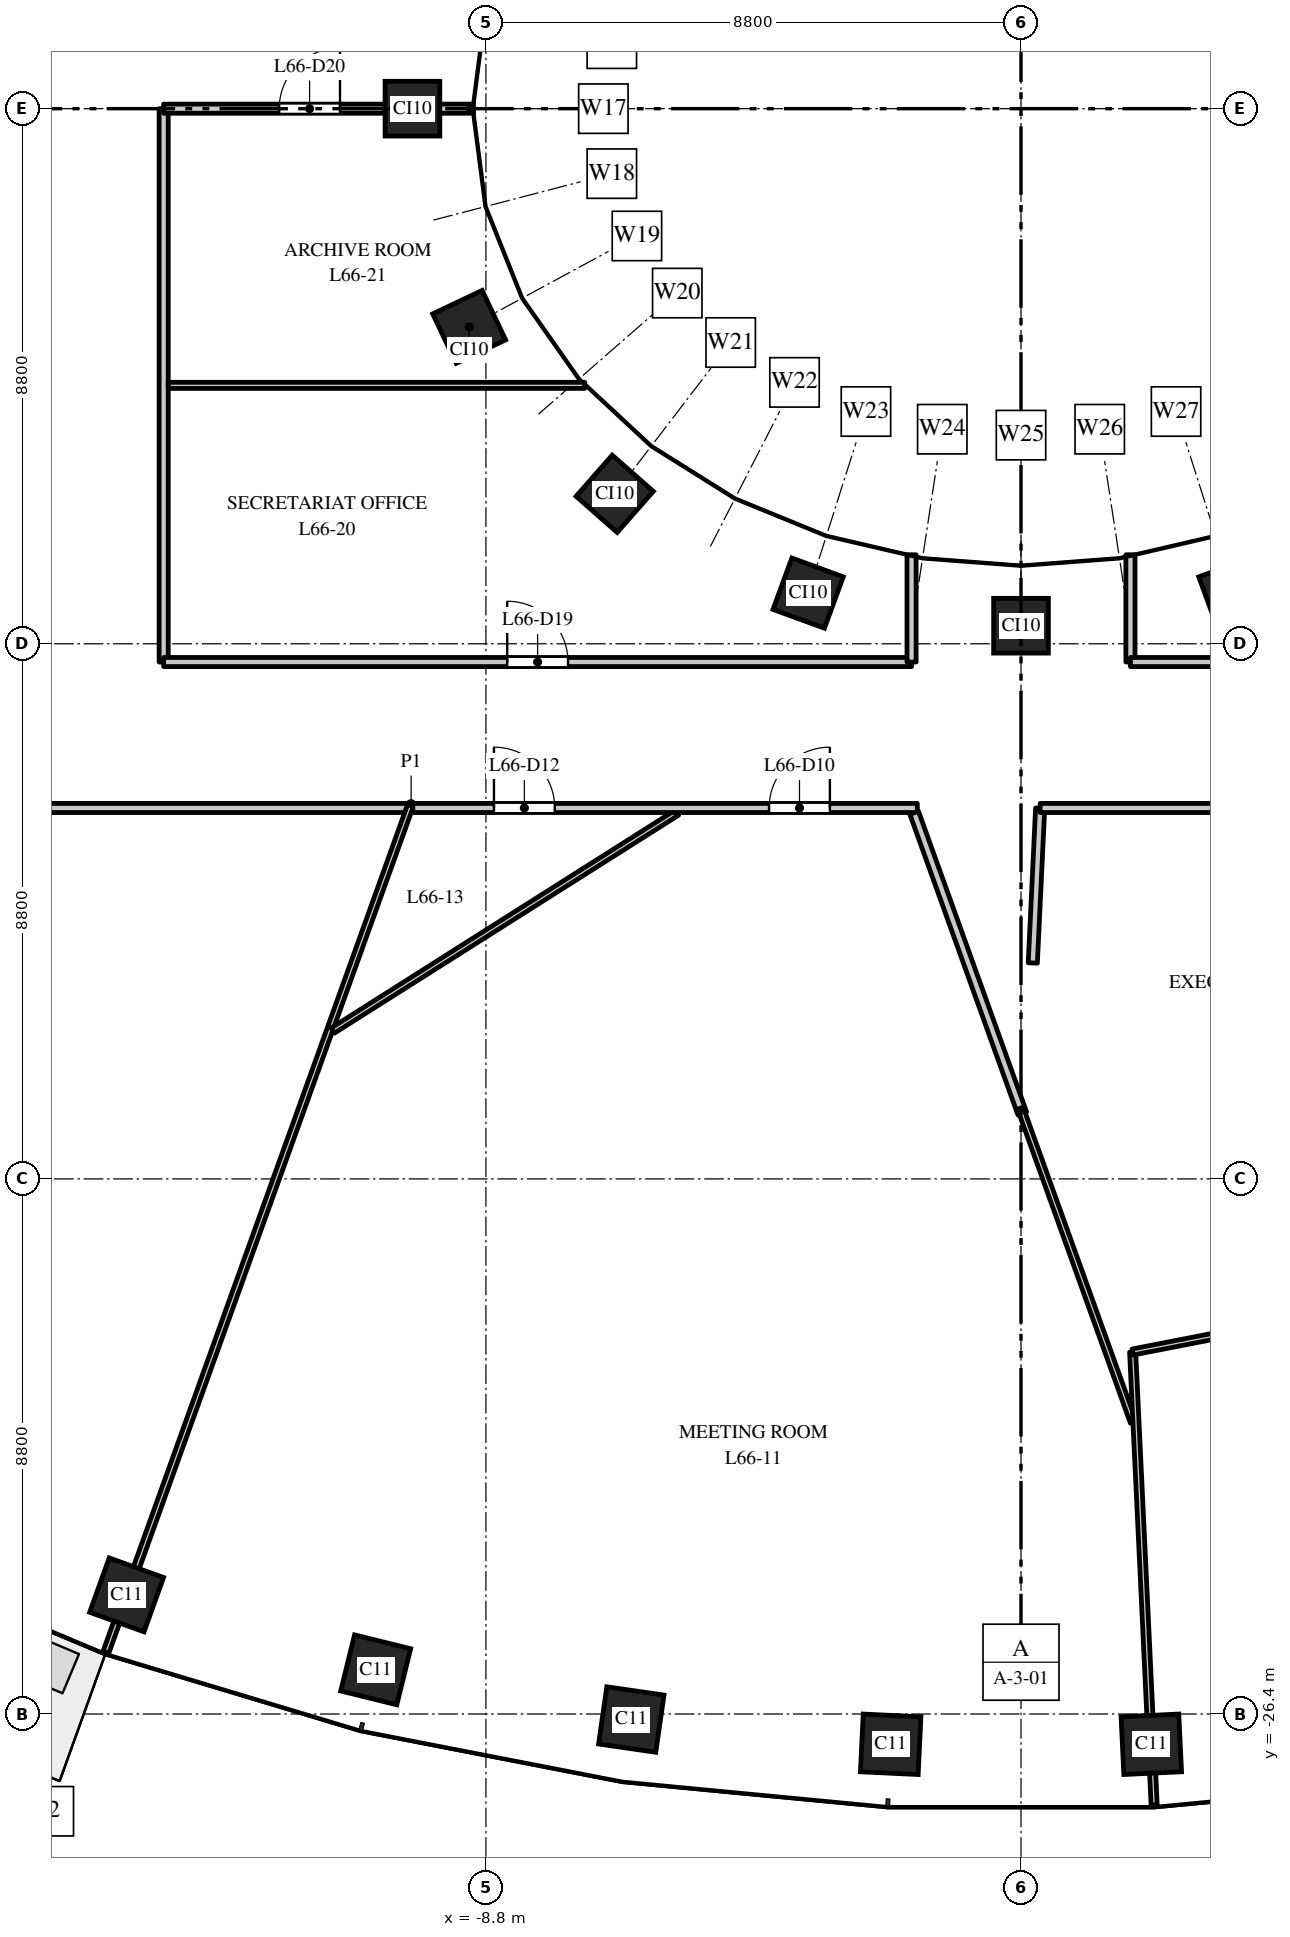
"""IFC4 building model, lengths in metres.
Left out: names, types, materials, properties, quantities, classifications, styles, units other than length and angle.
Written with IfcOpenShell. Run it as: python <this file> out.ifc"""

import sys

from ifc_helpers import new_model, si_unit, direction, frame, frame_2d, origin, origin_2d, place, context, subcontext, project, spatial, rectangle, extrude, element, fill, save


model = new_model("IFC4")
c1 = context("Model", 3, precision=1e-05, world=origin(), true_north=direction((0.0, 1.0)))
c2 = subcontext(c1, "Body", "Model", "MODEL_VIEW")
j1 = project(units=[si_unit("LENGTHUNIT", "METRE"), si_unit("PLANEANGLEUNIT", "RADIAN")], contexts=[c1])
p1 = place(None, origin())
s1 = spatial("IfcSite", under=j1, at=p1, CompositionType="ELEMENT")
p2 = place(p1, origin())
s2 = spatial("IfcBuilding", under=s1, at=p2, CompositionType="ELEMENT")
p3 = place(p2, frame((0.0, 0.0, 307.0)))
s3 = spatial("IfcBuildingStorey", under=s2, at=p3, CompositionType="ELEMENT", Elevation=307.0)
for number, where, z_axis, x_axis in (
    (1, (-14.709, -24.441, 0.0), (0.0, 0.0, 1.0), (0.941, -0.338, 0.0)),
    (2, (-10.613, -25.674, 0.0), (0.0, 0.0, 1.0), (0.971, -0.24, 0.0)),
    (3, (-6.409, -26.491, 0.0), (0.0, 0.0, 1.0), (0.99, -0.143, 0.0)),
    (4, (-2.143, -26.898, 0.0), (0.0, 0.0, 1.0), (0.999, -0.048, 0.0)),
    (5, (2.143, -26.898, 0.0), (0.0, 0.0, 1.0), (0.999, 0.048, 0.0)),
):
    element("IfcColumn", number, at=place(p3, frame(where, z_axis=z_axis, x_axis=x_axis)), inside=s3, PredefinedType="COLUMN", context=c2, shape_type="SweptSolid", body=[
        extrude(rectangle(XDim=0.95, YDim=0.95, at=origin_2d()), origin(), (0.0, 0.0, 1.0), 4.0),
    ])
for number, where, z_axis, x_axis in (
    (6, (-10.008, 0.0, 0.0), (0.0, 0.0, 1.0), (0.0, -1.0, 0.0)),
    (7, (-9.076, -3.588, 0.0), (0.0, 0.0, 1.0), (0.429, -0.903, 0.0)),
    (8, (-6.682, -6.334, 0.0), (0.0, 0.0, 1.0), (0.751, -0.66, 0.0)),
    (9, (-3.501, -7.967, 0.0), (0.0, 0.0, 1.0), (0.939, -0.344, 0.0)),
    (10, (0.0, -8.503, 0.0), (0.0, 0.0, 1.0), (1.0, 0.0, 0.0)),
    (11, (3.501, -7.967, 0.0), (0.0, 0.0, 1.0), (0.939, 0.344, 0.0)),
):
    element("IfcColumn", number, at=place(p3, frame(where, z_axis=z_axis, x_axis=x_axis)), inside=s3, PredefinedType="COLUMN", context=c2, shape_type="SweptSolid", body=[
        extrude(rectangle(XDim=0.9, YDim=0.9, at=origin_2d()), origin(), (0.0, 0.0, 1.0), 4.0),
    ])
p4 = place(p3, frame((-31.5, -11.5, 0.0), z_axis=(0.0, 0.0, 1.0), x_axis=(1.0, 0.0, 0.0)))
e12 = element("IfcWall", 12, at=p4, inside=s3, PredefinedType="PARTITIONING", context=c2, shape_type="SweptSolid", body=[
    extrude(rectangle(XDim=21.432, YDim=0.15, at=frame_2d((10.716, 0.0))), origin(), (0.0, 0.0, 1.0), 2.75),
])
p5 = place(p4, frame((2.9, 0.0, 0.0)))
e13 = element("IfcOpeningElement", 13, at=p5, cuts=e12, PredefinedType="OPENING", context=c2, shape_type="SweptSolid", body=[
    extrude(rectangle(XDim=1.0, YDim=2.1, at=frame_2d((0.5, 1.05))), frame((0.0, 0.085, 0.0), z_axis=(0.0, -1.0, 0.0), x_axis=(1.0, 0.0, 0.0)), (0.0, 0.0, 1.0), 0.17),
])
p6 = place(p4, frame((13.794, 0.0, 0.0)))
e14 = element("IfcOpeningElement", 14, at=p6, cuts=e12, PredefinedType="OPENING", context=c2, shape_type="SweptSolid", body=[
    extrude(rectangle(XDim=1.0, YDim=2.1, at=frame_2d((0.5, 1.05))), frame((0.0, 0.085, 0.0), z_axis=(0.0, -1.0, 0.0), x_axis=(1.0, 0.0, 0.0)), (0.0, 0.0, 1.0), 0.17),
])
p7 = place(p3, frame((-15.049, -25.383, 0.0), z_axis=(0.0, 0.0, 1.0), x_axis=(0.338454781071, 0.94098265721, 0.0)))
e15 = element("IfcWall", 15, at=p7, inside=s3, PredefinedType="PARTITIONING", context=c2, shape_type="SweptSolid", body=[
    extrude(rectangle(XDim=14.829, YDim=0.1, at=frame_2d((7.415, 0.0))), origin(), (0.0, 0.0, 1.0), 2.75),
])
p8 = place(p3, frame((-14.1, -9.1, 0.0), z_axis=(0.0, 0.0, 1.0), x_axis=(0.0, 1.0, 0.0)))
e16 = element("IfcWall", 16, at=p8, inside=s3, PredefinedType="PARTITIONING", context=c2, shape_type="SweptSolid", body=[
    extrude(rectangle(XDim=9.1, YDim=0.15, at=frame_2d((4.55, 0.0))), origin(), (0.0, 0.0, 1.0), 3.7),
])
p9 = place(p3, frame((-14.1, -9.1, 0.0), z_axis=(0.0, 0.0, 1.0), x_axis=(1.0, 0.0, 0.0)))
e17 = element("IfcWall", 17, at=p9, inside=s3, PredefinedType="PARTITIONING", context=c2, shape_type="SweptSolid", body=[
    extrude(rectangle(XDim=12.3, YDim=0.15, at=frame_2d((6.15, 0.0))), origin(), (0.0, 0.0, 1.0), 2.75),
])
p10 = place(p9, frame((5.65, 0.0, 0.0)))
e18 = element("IfcOpeningElement", 18, at=p10, cuts=e17, PredefinedType="OPENING", context=c2, shape_type="SweptSolid", body=[
    extrude(rectangle(XDim=1.0, YDim=2.1, at=frame_2d((0.5, 1.05))), frame((0.0, 0.085, 0.0), z_axis=(0.0, -1.0, 0.0), x_axis=(1.0, 0.0, 0.0)), (0.0, 0.0, 1.0), 0.17),
])
p11 = place(p3, frame((-14.025, -4.55, 0.0), z_axis=(0.0, 0.0, 1.0), x_axis=(1.0, 0.0, 0.0)))
e19 = element("IfcWall", 19, at=p11, inside=s3, PredefinedType="PARTITIONING", context=c2, shape_type="SweptSolid", body=[
    extrude(rectangle(XDim=6.851, YDim=0.1, at=frame_2d((3.425, 0.0))), origin(), (0.0, 0.0, 1.0), 3.0),
])
p12 = place(p3, frame((-14.1, 0.0, 0.0), z_axis=(0.0, 0.0, 1.0), x_axis=(1.0, 0.0, 0.0)))
e20 = element("IfcWall", 20, at=p12, inside=s3, PredefinedType="PARTITIONING", context=c2, shape_type="SweptSolid", body=[
    extrude(rectangle(XDim=5.095, YDim=0.15, at=frame_2d((2.548, 0.0))), origin(), (0.0, 0.0, 1.0), 3.7),
])
p13 = place(p12, frame((1.9, 0.0, 0.0)))
e21 = element("IfcOpeningElement", 21, at=p13, cuts=e20, PredefinedType="OPENING", context=c2, shape_type="SweptSolid", body=[
    extrude(rectangle(XDim=1.0, YDim=2.1, at=frame_2d((0.5, 1.05))), frame((0.0, 0.085, 0.0), z_axis=(0.0, -1.0, 0.0), x_axis=(1.0, 0.0, 0.0)), (0.0, 0.0, 1.0), 0.17),
])
p14 = place(p3, frame((-11.319, -15.161, 0.0), z_axis=(0.0, 0.0, 1.0), x_axis=(0.844865171483, 0.534979291203, 0.0)))
e22 = element("IfcWall", 22, at=p14, inside=s3, PredefinedType="PARTITIONING", context=c2, shape_type="SweptSolid", body=[
    extrude(rectangle(XDim=6.703, YDim=0.1, at=frame_2d((3.352, 0.0))), origin(), (0.0, 0.0, 1.0), 3.7),
])
p15 = place(p3, frame((-10.003, -11.5, 0.0), z_axis=(0.0, 0.0, 1.0), x_axis=(1.0, 0.0, 0.0)))
e23 = element("IfcWall", 23, at=p15, inside=s3, PredefinedType="PARTITIONING", context=c2, shape_type="SweptSolid", body=[
    extrude(rectangle(XDim=8.298, YDim=0.15, at=frame_2d((4.149, 0.0))), origin(), (0.0, 0.0, 1.0), 2.75),
])
p16 = place(p15, frame((5.86, 0.0, 0.0)))
e24 = element("IfcOpeningElement", 24, at=p16, cuts=e23, PredefinedType="OPENING", context=c2, shape_type="SweptSolid", body=[
    extrude(rectangle(XDim=1.0, YDim=2.1, at=frame_2d((0.5, 1.05))), frame((0.0, 0.085, 0.0), z_axis=(0.0, -1.0, 0.0), x_axis=(1.0, 0.0, 0.0)), (0.0, 0.0, 1.0), 0.17),
])
p17 = place(p15, frame((1.335, 0.0, 0.0)))
e25 = element("IfcOpeningElement", 25, at=p17, cuts=e23, PredefinedType="OPENING", context=c2, shape_type="SweptSolid", body=[
    extrude(rectangle(XDim=1.0, YDim=2.1, at=frame_2d((0.5, 1.05))), frame((0.0, 0.085, 0.0), z_axis=(0.0, -1.0, 0.0), x_axis=(1.0, 0.0, 0.0)), (0.0, 0.0, 1.0), 0.17),
])
p18 = place(p3, frame((-1.8, -9.1, 0.0), z_axis=(0.0, 0.0, 1.0), x_axis=(0.0, 1.0, 0.0)))
e26 = element("IfcWall", 26, at=p18, inside=s3, PredefinedType="PARTITIONING", context=c2, shape_type="SweptSolid", body=[
    extrude(rectangle(XDim=1.764, YDim=0.15, at=frame_2d((0.882, 0.0))), origin(), (0.0, 0.0, 1.0), 3.0),
])
p19 = place(p3, frame((-1.757, -11.579, 0.0), z_axis=(0.0, 0.0, 1.0), x_axis=(0.338313142308, -0.941033590124, 0.0)))
e27 = element("IfcWall", 27, at=p19, inside=s3, PredefinedType="PARTITIONING", context=c2, shape_type="SweptSolid", body=[
    extrude(rectangle(XDim=5.256, YDim=0.15, at=frame_2d((2.628, 0.0))), origin(), (0.0, 0.0, 1.0), 2.85),
])
p20 = place(p3, frame((-0.01, -16.438, 0.0), z_axis=(0.0, 0.0, 1.0), x_axis=(0.338376018219, -0.941010983089, 0.0)))
e28 = element("IfcWall", 28, at=p20, inside=s3, PredefinedType="PARTITIONING", context=c2, shape_type="SweptSolid", body=[
    extrude(rectangle(XDim=5.488, YDim=0.1, at=frame_2d((2.744, 0.0))), origin(), (0.0, 0.0, 1.0), 3.7),
])
p21 = place(p3, frame((0.194, -14.049, 0.0), z_axis=(0.0, 0.0, 1.0), x_axis=(0.047428579634, 0.99887463169, 0.0)))
e29 = element("IfcWall", 29, at=p21, inside=s3, PredefinedType="PARTITIONING", context=c2, shape_type="SweptSolid", body=[
    extrude(rectangle(XDim=2.548, YDim=0.15, at=frame_2d((1.274, 0.0))), origin(), (0.0, 0.0, 1.0), 3.7),
])
p22 = place(p3, frame((0.315, -11.5, 0.0), z_axis=(0.0, 0.0, 1.0), x_axis=(1.0, 0.0, 0.0)))
e30 = element("IfcWall", 30, at=p22, inside=s3, PredefinedType="PARTITIONING", context=c2, shape_type="SweptSolid", body=[
    extrude(rectangle(XDim=31.185, YDim=0.15, at=frame_2d((15.593, 0.0))), origin(), (0.0, 0.0, 1.0), 2.75),
])
p23 = place(p22, frame((10.9, 0.0, 0.0)))
e31 = element("IfcOpeningElement", 31, at=p23, cuts=e30, PredefinedType="OPENING", context=c2, shape_type="SweptSolid", body=[
    extrude(rectangle(XDim=1.0, YDim=2.1, at=frame_2d((0.5, 1.05))), frame((0.0, 0.085, 0.0), z_axis=(0.0, -1.0, 0.0), x_axis=(1.0, 0.0, 0.0)), (0.0, 0.0, 1.0), 0.17),
])
p24 = place(p22, frame((26.003, 0.0, 0.0)))
e32 = element("IfcOpeningElement", 32, at=p24, cuts=e30, PredefinedType="OPENING", context=c2, shape_type="SweptSolid", body=[
    extrude(rectangle(XDim=1.0, YDim=2.1, at=frame_2d((0.5, 1.05))), frame((0.0, 0.085, 0.0), z_axis=(0.0, -1.0, 0.0), x_axis=(1.0, 0.0, 0.0)), (0.0, 0.0, 1.0), 0.17),
])
p25 = place(p3, frame((1.8, -9.1, 0.0), z_axis=(0.0, 0.0, 1.0), x_axis=(0.0, 1.0, 0.0)))
e33 = element("IfcWall", 33, at=p25, inside=s3, PredefinedType="PARTITIONING", context=c2, shape_type="SweptSolid", body=[
    extrude(rectangle(XDim=1.764, YDim=0.15, at=frame_2d((0.882, 0.0))), origin(), (0.0, 0.0, 1.0), 3.0),
])
p26 = place(p3, frame((1.8, -9.1, 0.0), z_axis=(0.0, 0.0, 1.0), x_axis=(1.0, 0.0, 0.0)))
e34 = element("IfcWall", 34, at=p26, inside=s3, PredefinedType="PARTITIONING", context=c2, shape_type="SweptSolid", body=[
    extrude(rectangle(XDim=12.3, YDim=0.15, at=frame_2d((6.15, 0.0))), origin(), (0.0, 0.0, 1.0), 2.85),
])
p27 = place(p26, frame((5.65, 0.0, 0.0)))
e35 = element("IfcOpeningElement", 35, at=p27, cuts=e34, PredefinedType="OPENING", context=c2, shape_type="SweptSolid", body=[
    extrude(rectangle(XDim=1.0, YDim=2.1, at=frame_2d((0.5, 1.05))), frame((0.0, 0.085, 0.0), z_axis=(0.0, -1.0, 0.0), x_axis=(1.0, 0.0, 0.0)), (0.0, 0.0, 1.0), 0.17),
])
p28 = place(p3, frame((1.836, -20.448, 0.0), z_axis=(0.0, 0.0, 1.0), x_axis=(0.04746405939, -0.998872946408, 0.0)))
e36 = element("IfcWall", 36, at=p28, inside=s3, PredefinedType="PARTITIONING", context=c2, shape_type="SweptSolid", body=[
    extrude(rectangle(XDim=7.458, YDim=0.1, at=frame_2d((3.729, 0.0))), origin(), (0.0, 0.0, 1.0), 3.0),
])
p29 = place(p3, frame((1.836, -20.447, 0.0), z_axis=(0.0, 0.0, 1.0), x_axis=(0.98151990149, 0.191360087216, 0.0)))
e37 = element("IfcWall", 37, at=p29, inside=s3, PredefinedType="PARTITIONING", context=c2, shape_type="SweptSolid", body=[
    extrude(rectangle(XDim=11.032, YDim=0.1, at=frame_2d((5.516, 0.0))), origin(), (0.0, 0.0, 1.0), 2.85),
])
p30 = place(p16, origin())
e38 = element("IfcDoor", 38, at=p30, inside=s3, OperationType="SINGLE_SWING_RIGHT", PredefinedType="DOOR", context=c2, shape_type="SweptSolid", body=[
    extrude(rectangle(XDim=1.0, YDim=2.1, at=frame_2d((0.5, 1.05))), frame((0.0, 0.025, 0.0), z_axis=(0.0, -1.0, 0.0), x_axis=(1.0, 0.0, 0.0)), (0.0, 0.0, 1.0), 0.05),
])
fill(e24, e38)
p31 = place(p17, origin())
e39 = element("IfcDoor", 39, at=p31, inside=s3, OperationType="SINGLE_SWING_LEFT", PredefinedType="DOOR", context=c2, shape_type="SweptSolid", body=[
    extrude(rectangle(XDim=1.0, YDim=2.1, at=frame_2d((0.5, 1.05))), frame((0.0, 0.025, 0.0), z_axis=(0.0, -1.0, 0.0), x_axis=(1.0, 0.0, 0.0)), (0.0, 0.0, 1.0), 0.05),
])
fill(e25, e39)
p32 = place(p10, origin())
e40 = element("IfcDoor", 40, at=p32, inside=s3, OperationType="SINGLE_SWING_LEFT", PredefinedType="DOOR", context=c2, shape_type="SweptSolid", body=[
    extrude(rectangle(XDim=1.0, YDim=2.1, at=frame_2d((0.5, 1.05))), frame((0.0, 0.025, 0.0), z_axis=(0.0, -1.0, 0.0), x_axis=(1.0, 0.0, 0.0)), (0.0, 0.0, 1.0), 0.05),
])
fill(e18, e40)
p33 = place(p13, origin())
e41 = element("IfcDoor", 41, at=p33, inside=s3, OperationType="SINGLE_SWING_RIGHT", PredefinedType="DOOR", context=c2, shape_type="SweptSolid", body=[
    extrude(rectangle(XDim=1.0, YDim=2.1, at=frame_2d((0.5, 1.05))), frame((0.0, 0.025, 0.0), z_axis=(0.0, -1.0, 0.0), x_axis=(1.0, 0.0, 0.0)), (0.0, 0.0, 1.0), 0.05),
])
fill(e21, e41)
save(model, sys.argv[1])
